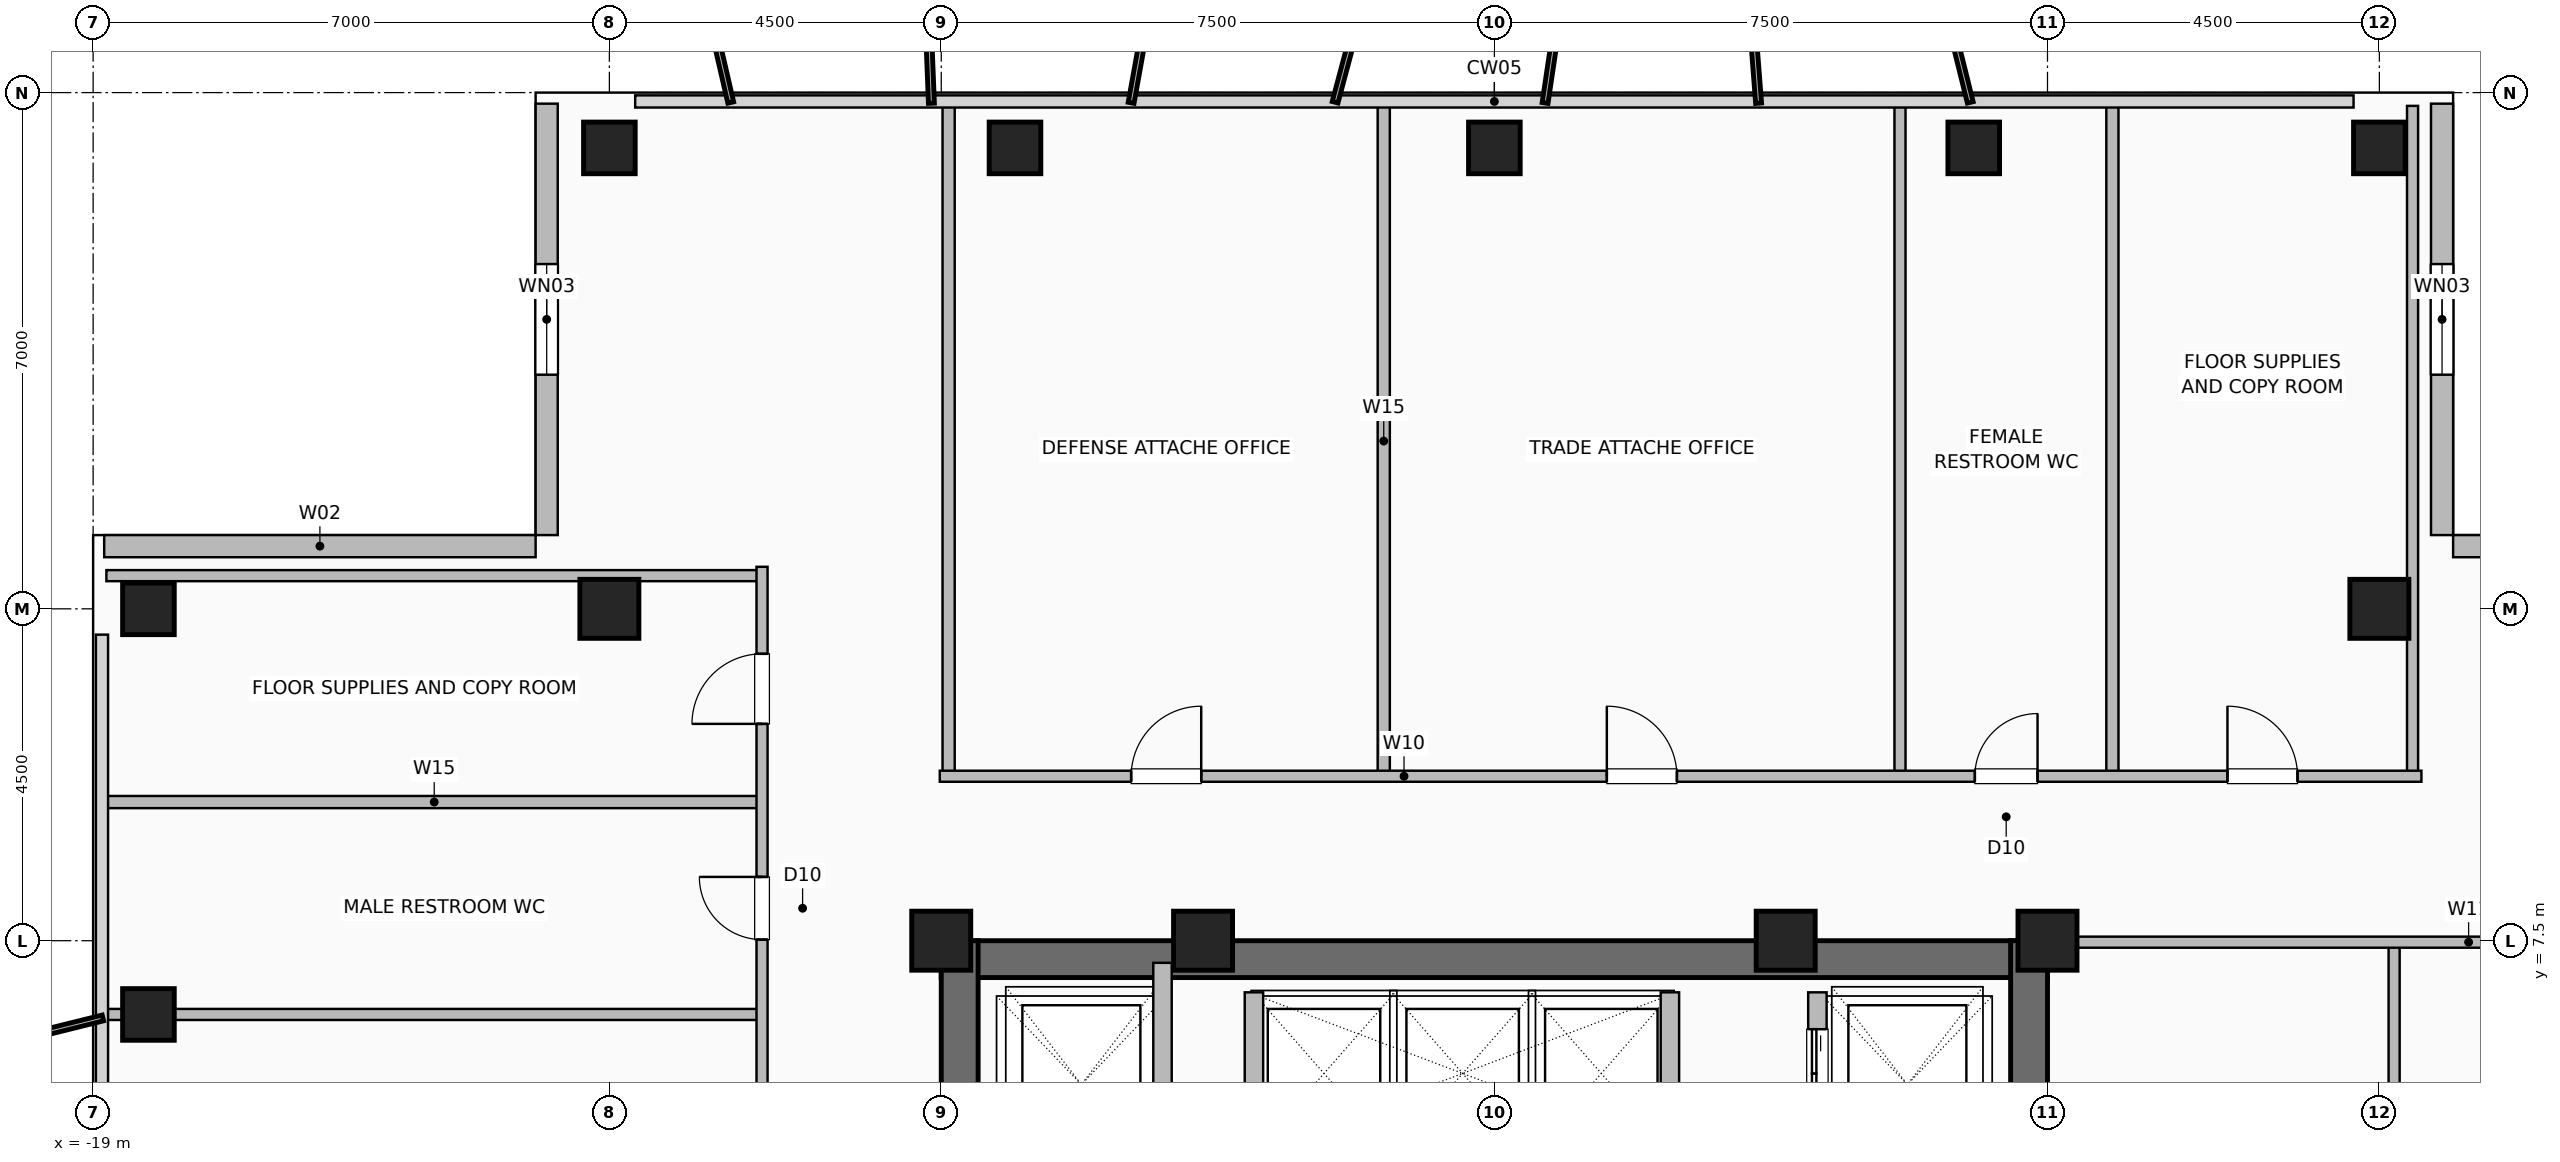
"""IFC4 building model, lengths in metres.
Left out: names, types, materials, properties, quantities, classifications, styles, units other than length and angle.
Written with IfcOpenShell. Run it as: python <this file> out.ifc"""

import sys

from ifc_helpers import new_model, si_unit, direction, frame, frame_2d, origin, origin_2d, place, context, subcontext, project, spatial, rectangle, hollow_rectangle, extrude, element, fill, save


model = new_model("IFC4")
c1 = context("Model", 3, precision=1e-05, world=origin(), true_north=direction((0.0, 1.0)))
c2 = subcontext(c1, "Body", "Model", "MODEL_VIEW")
j1 = project(units=[si_unit("LENGTHUNIT", "METRE"), si_unit("PLANEANGLEUNIT", "RADIAN")], contexts=[c1])
p1 = place(None, origin())
s1 = spatial("IfcSite", under=j1, at=p1, CompositionType="ELEMENT")
p2 = place(p1, origin())
s2 = spatial("IfcBuilding", under=s1, at=p2, CompositionType="ELEMENT")
p3 = place(p2, frame((0.0, 0.0, 239.6)))
s3 = spatial("IfcBuildingStorey", under=s2, at=p3, CompositionType="ELEMENT", Elevation=239.6)
for number, where, z_axis, x_axis in (
    (1, (7.5, 7.5, 0.0), (0.0, 0.0, 1.0), (1.0, 0.0, 0.0)),
    (2, (3.95, 7.5, 0.0), (0.0, 0.0, 1.0), (1.0, 0.0, 0.0)),
    (3, (-3.95, 7.5, 0.0), (0.0, 0.0, 1.0), (1.0, 0.0, 0.0)),
    (4, (-7.5, 7.5, 0.0), (0.0, 0.0, 1.0), (1.0, 0.0, 0.0)),
):
    element("IfcColumn", number, at=place(p3, frame(where, z_axis=z_axis, x_axis=x_axis)), inside=s3, PredefinedType="COLUMN", context=c2, shape_type="SweptSolid", body=[
        extrude(hollow_rectangle(XDim=0.8, YDim=0.8, WallThickness=0.04, at=origin_2d()), origin(), (0.0, 0.0, 1.0), 3.6),
    ])
for number, where, z_axis, x_axis in (
    (5, (-12.0, 18.25, 0.0), (0.0, 0.0, 1.0), (1.0, 0.0, 0.0)),
    (6, (-6.5, 18.25, 0.0), (0.0, 0.0, 1.0), (1.0, 0.0, 0.0)),
    (7, (0.0, 18.25, 0.0), (0.0, 0.0, 1.0), (1.0, 0.0, 0.0)),
    (8, (6.5, 18.25, 0.0), (0.0, 0.0, 1.0), (1.0, 0.0, 0.0)),
    (9, (-18.25, 6.5, 0.0), (0.0, 0.0, 1.0), (1.0, 0.0, 0.0)),
    (10, (12.0, 18.25, 0.0), (0.0, 0.0, 1.0), (1.0, 0.0, 0.0)),
    (11, (-18.25, 12.0, 0.0), (0.0, 0.0, 1.0), (1.0, 0.0, 0.0)),
):
    element("IfcColumn", number, at=place(p3, frame(where, z_axis=z_axis, x_axis=x_axis)), inside=s3, PredefinedType="COLUMN", context=c2, shape_type="SweptSolid", body=[
        extrude(hollow_rectangle(XDim=0.7, YDim=0.7, WallThickness=0.035, at=origin_2d()), origin(), (0.0, 0.0, 1.0), 3.6),
    ])
for number, where, z_axis, x_axis in (
    (12, (12.0, 12.0, 0.0), (0.0, 0.0, 1.0), (1.0, 0.0, 0.0)),
    (13, (-12.0, 12.0, 0.0), (0.0, 0.0, 1.0), (1.0, 0.0, 0.0)),
):
    element("IfcColumn", number, at=place(p3, frame(where, z_axis=z_axis, x_axis=x_axis)), inside=s3, PredefinedType="COLUMN", context=c2, shape_type="SweptSolid", body=[
        extrude(hollow_rectangle(XDim=0.8, YDim=0.8, WallThickness=0.04, at=origin_2d()), origin(), (0.0, 0.0, 1.0), 3.6),
    ])
p4 = place(p3, frame((12.85, 18.85, 0.0), z_axis=(0.0, 0.0, 1.0), x_axis=(0.0, -1.0, 0.0)))
e14 = element("IfcWall", 14, at=p4, inside=s3, PredefinedType="SOLIDWALL", context=c2, shape_type="SweptSolid", body=[
    extrude(rectangle(XDim=5.85, YDim=0.3, at=frame_2d((2.925, 0.0))), origin(), (0.0, 0.0, 1.0), 3.36),
])
p5 = place(p4, frame((2.175, 0.0, 0.9)))
e15 = element("IfcOpeningElement", 15, at=p5, cuts=e14, PredefinedType="OPENING", context=c2, shape_type="SweptSolid", body=[
    extrude(rectangle(XDim=1.5, YDim=1.8, at=frame_2d((0.75, 0.9))), frame((0.0, 0.16, 0.0), z_axis=(0.0, -1.0, 0.0), x_axis=(1.0, 0.0, 0.0)), (0.0, 0.0, 1.0), 0.32),
])
p6 = place(p3, frame((18.85, 12.85, 0.0), z_axis=(0.0, 0.0, 1.0), x_axis=(-1.0, 0.0, 0.0)))
e16 = element("IfcWall", 16, at=p6, inside=s3, PredefinedType="SOLIDWALL", context=c2, shape_type="SweptSolid", body=[
    extrude(rectangle(XDim=5.85, YDim=0.3, at=frame_2d((2.925, 0.0))), origin(), (0.0, 0.0, 1.0), 3.36),
])
p7 = place(p3, frame((-12.85, 18.85, 0.0), z_axis=(0.0, 0.0, 1.0), x_axis=(0.0, -1.0, 0.0)))
e17 = element("IfcWall", 17, at=p7, inside=s3, PredefinedType="SOLIDWALL", context=c2, shape_type="SweptSolid", body=[
    extrude(rectangle(XDim=5.85, YDim=0.3, at=frame_2d((2.925, 0.0))), origin(), (0.0, 0.0, 1.0), 3.36),
])
p8 = place(p7, frame((2.175, 0.0, 0.9)))
e18 = element("IfcOpeningElement", 18, at=p8, cuts=e17, PredefinedType="OPENING", context=c2, shape_type="SweptSolid", body=[
    extrude(rectangle(XDim=1.5, YDim=1.8, at=frame_2d((0.75, 0.9))), frame((0.0, 0.16, 0.0), z_axis=(0.0, -1.0, 0.0), x_axis=(1.0, 0.0, 0.0)), (0.0, 0.0, 1.0), 0.32),
])
p9 = place(p3, frame((-18.85, 12.85, 0.0), z_axis=(0.0, 0.0, 1.0), x_axis=(1.0, 0.0, 0.0)))
e19 = element("IfcWall", 19, at=p9, inside=s3, PredefinedType="SOLIDWALL", context=c2, shape_type="SweptSolid", body=[
    extrude(rectangle(XDim=5.85, YDim=0.3, at=frame_2d((2.925, 0.0))), origin(), (0.0, 0.0, 1.0), 3.36),
])
p10 = place(p3, frame((-7.5, 7.25, 0.0), z_axis=(0.0, 0.0, 1.0), x_axis=(1.0, 0.0, 0.0)))
e20 = element("IfcWall", 20, at=p10, inside=s3, PredefinedType="SHEAR", context=c2, shape_type="SweptSolid", body=[
    extrude(rectangle(XDim=15.0, YDim=0.5, at=frame_2d((7.5, 0.0))), origin(), (0.0, 0.0, 1.0), 3.36),
])
p11 = place(p3, frame((-7.25, -7.5, 0.0), z_axis=(0.0, 0.0, 1.0), x_axis=(0.0, 1.0, 0.0)))
e21 = element("IfcWall", 21, at=p11, inside=s3, PredefinedType="SHEAR", context=c2, shape_type="SweptSolid", body=[
    extrude(rectangle(XDim=15.0, YDim=0.5, at=frame_2d((7.5, 0.0))), origin(), (0.0, 0.0, 1.0), 3.36),
])
p12 = place(p11, frame((9.5, 0.0, 0.0)))
e22 = element("IfcOpeningElement", 22, at=p12, cuts=e21, PredefinedType="OPENING", context=c2, shape_type="SweptSolid", body=[
    extrude(rectangle(XDim=1.0, YDim=2.08, at=frame_2d((0.5, 1.04))), frame((0.0, 0.26, 0.0), z_axis=(0.0, -1.0, 0.0), x_axis=(1.0, 0.0, 0.0)), (0.0, 0.0, 1.0), 0.52),
])
p13 = place(p3, frame((7.25, -7.5, 0.0), z_axis=(0.0, 0.0, 1.0), x_axis=(0.0, 1.0, 0.0)))
e23 = element("IfcWall", 23, at=p13, inside=s3, PredefinedType="SHEAR", context=c2, shape_type="SweptSolid", body=[
    extrude(rectangle(XDim=15.0, YDim=0.5, at=frame_2d((7.5, 0.0))), origin(), (0.0, 0.0, 1.0), 3.36),
])
for number, where, z_axis, x_axis in (
    (24, (-3.26, 4.58, 0.0), (0.0, 0.0, 1.0), (0.0, 1.0, 0.0)),
    (25, (2.38, 4.58, 0.0), (0.0, 0.0, 1.0), (0.0, 1.0, 0.0)),
):
    element("IfcWall", number, at=place(p3, frame(where, z_axis=z_axis, x_axis=x_axis)), inside=s3, PredefinedType="SHEAR", context=c2, shape_type="SweptSolid", body=[
        extrude(rectangle(XDim=2.22, YDim=0.25, at=frame_2d((1.11, 0.0))), origin(), (0.0, 0.0, 1.0), 3.36),
    ])
p14 = place(p3, frame((-4.5, 4.35, 0.0), z_axis=(0.0, 0.0, 1.0), x_axis=(0.0, 1.0, 0.0)))
e26 = element("IfcWall", 26, at=p14, inside=s3, PredefinedType="SHEAR", context=c2, shape_type="SweptSolid", body=[
    extrude(rectangle(XDim=2.85, YDim=0.25, at=frame_2d((1.425, 0.0))), origin(), (0.0, 0.0, 1.0), 3.36),
])
p15 = place(p3, frame((4.38, 4.3, 0.0), z_axis=(0.0, 0.0, 1.0), x_axis=(0.0, 1.0, 0.0)))
e27 = element("IfcWall", 27, at=p15, inside=s3, PredefinedType="SHEAR", context=c2, shape_type="SweptSolid", body=[
    extrude(rectangle(XDim=2.5, YDim=0.25, at=frame_2d((1.25, 0.0))), origin(), (0.0, 0.0, 1.0), 3.36),
])
p16 = place(p15, frame((0.8, 0.0, 0.0)))
e28 = element("IfcOpeningElement", 28, at=p16, cuts=e27, PredefinedType="OPENING", context=c2, shape_type="SweptSolid", body=[
    extrude(rectangle(XDim=1.2, YDim=2.2, at=frame_2d((0.6, 1.1))), frame((0.0, 0.135, 0.0), z_axis=(0.0, -1.0, 0.0), x_axis=(1.0, 0.0, 0.0)), (0.0, 0.0, 1.0), 0.27),
])
p17 = place(p3, frame((-18.82, 9.38, 0.0), z_axis=(0.0, 0.0, 1.0), x_axis=(1.0, 0.0, 0.0)))
e29 = element("IfcWall", 29, at=p17, inside=s3, PredefinedType="PLUMBINGWALL", context=c2, shape_type="SweptSolid", body=[
    extrude(rectangle(XDim=8.89, YDim=0.165, at=frame_2d((4.445, 0.0))), origin(), (0.0, 0.0, 1.0), 3.36),
])
for number, where, z_axis, x_axis in (
    (30, (-18.82, 6.5, 0.0), (0.0, 0.0, 1.0), (1.0, 0.0, 0.0)),
    (31, (-18.82, 12.45, 0.0), (0.0, 0.0, 1.0), (1.0, 0.0, 0.0)),
):
    element("IfcWall", number, at=place(p3, frame(where, z_axis=z_axis, x_axis=x_axis)), inside=s3, PredefinedType="PARTITIONING", context=c2, shape_type="SweptSolid", body=[
        extrude(rectangle(XDim=8.89, YDim=0.15, at=frame_2d((4.445, 0.0))), origin(), (0.0, 0.0, 1.0), 3.36),
    ])
p18 = place(p3, frame((-9.93, -7.52, 0.0), z_axis=(0.0, 0.0, 1.0), x_axis=(0.0, 1.0, 0.0)))
e32 = element("IfcWall", 32, at=p18, inside=s3, PredefinedType="PARTITIONING", context=c2, shape_type="SweptSolid", body=[
    extrude(rectangle(XDim=20.09, YDim=0.15, at=frame_2d((10.045, 0.0))), origin(), (0.0, 0.0, 1.0), 3.36),
])
p19 = place(p18, frame((1.945, 0.0, 0.0)))
e33 = element("IfcOpeningElement", 33, at=p19, cuts=e32, PredefinedType="OPENING", context=c2, shape_type="SweptSolid", body=[
    extrude(rectangle(XDim=0.95, YDim=2.06, at=frame_2d((0.475, 1.03))), frame((0.0, 0.085, 0.0), z_axis=(0.0, -1.0, 0.0), x_axis=(1.0, 0.0, 0.0)), (0.0, 0.0, 1.0), 0.17),
])
p20 = place(p18, frame((6.47, 0.0, 0.0)))
e34 = element("IfcOpeningElement", 34, at=p20, cuts=e32, PredefinedType="OPENING", context=c2, shape_type="SweptSolid", body=[
    extrude(rectangle(XDim=0.95, YDim=2.06, at=frame_2d((0.475, 1.03))), frame((0.0, 0.085, 0.0), z_axis=(0.0, -1.0, 0.0), x_axis=(1.0, 0.0, 0.0)), (0.0, 0.0, 1.0), 0.17),
])
p21 = place(p18, frame((11.12, 0.0, 0.0)))
e35 = element("IfcOpeningElement", 35, at=p21, cuts=e32, PredefinedType="OPENING", context=c2, shape_type="SweptSolid", body=[
    extrude(rectangle(XDim=0.95, YDim=2.06, at=frame_2d((0.475, 1.03))), frame((0.0, 0.085, 0.0), z_axis=(0.0, -1.0, 0.0), x_axis=(1.0, 0.0, 0.0)), (0.0, 0.0, 1.0), 0.17),
])
p22 = place(p18, frame((15.035, 0.0, 0.0)))
e36 = element("IfcOpeningElement", 36, at=p22, cuts=e32, PredefinedType="OPENING", context=c2, shape_type="SweptSolid", body=[
    extrude(rectangle(XDim=0.85, YDim=2.05, at=frame_2d((0.425, 1.025))), frame((0.0, 0.085, 0.0), z_axis=(0.0, -1.0, 0.0), x_axis=(1.0, 0.0, 0.0)), (0.0, 0.0, 1.0), 0.17),
])
p23 = place(p18, frame((17.96, 0.0, 0.0)))
e37 = element("IfcOpeningElement", 37, at=p23, cuts=e32, PredefinedType="OPENING", context=c2, shape_type="SweptSolid", body=[
    extrude(rectangle(XDim=0.95, YDim=2.06, at=frame_2d((0.475, 1.03))), frame((0.0, 0.085, 0.0), z_axis=(0.0, -1.0, 0.0), x_axis=(1.0, 0.0, 0.0)), (0.0, 0.0, 1.0), 0.17),
])
for number, where, z_axis, x_axis in (
    (38, (8.38, 9.73, 0.0), (0.0, 0.0, 1.0), (0.0, 1.0, 0.0)),
    (39, (-7.4, 9.73, 0.0), (0.0, 0.0, 1.0), (0.0, 1.0, 0.0)),
    (40, (-1.5, 9.73, 0.0), (0.0, 0.0, 1.0), (0.0, 1.0, 0.0)),
):
    element("IfcWall", number, at=place(p3, frame(where, z_axis=z_axis, x_axis=x_axis)), inside=s3, PredefinedType="PLUMBINGWALL", context=c2, shape_type="SweptSolid", body=[
        extrude(rectangle(XDim=9.09, YDim=0.165, at=frame_2d((4.545, 0.0))), origin(), (0.0, 0.0, 1.0), 3.36),
    ])
for number, where, z_axis, x_axis in (
    (41, (5.5, 9.73, 0.0), (0.0, 0.0, 1.0), (0.0, 1.0, 0.0)),
    (42, (12.45, 9.73, 0.0), (0.0, 0.0, 1.0), (0.0, 1.0, 0.0)),
):
    element("IfcWall", number, at=place(p3, frame(where, z_axis=z_axis, x_axis=x_axis)), inside=s3, PredefinedType="PARTITIONING", context=c2, shape_type="SweptSolid", body=[
        extrude(rectangle(XDim=9.09, YDim=0.15, at=frame_2d((4.545, 0.0))), origin(), (0.0, 0.0, 1.0), 3.36),
    ])
p24 = place(p3, frame((-7.52, 9.73, 0.0), z_axis=(0.0, 0.0, 1.0), x_axis=(1.0, 0.0, 0.0)))
e43 = element("IfcWall", 43, at=p24, inside=s3, PredefinedType="PARTITIONING", context=c2, shape_type="SweptSolid", body=[
    extrude(rectangle(XDim=20.09, YDim=0.15, at=frame_2d((10.045, 0.0))), origin(), (0.0, 0.0, 1.0), 3.36),
])
p25 = place(p24, frame((2.595, 0.0, 0.0)))
e44 = element("IfcOpeningElement", 44, at=p25, cuts=e43, PredefinedType="OPENING", context=c2, shape_type="SweptSolid", body=[
    extrude(rectangle(XDim=0.95, YDim=2.06, at=frame_2d((0.475, 1.03))), frame((0.0, 0.085, 0.0), z_axis=(0.0, -1.0, 0.0), x_axis=(1.0, 0.0, 0.0)), (0.0, 0.0, 1.0), 0.17),
])
p26 = place(p24, frame((9.045, 0.0, 0.0)))
e45 = element("IfcOpeningElement", 45, at=p26, cuts=e43, PredefinedType="OPENING", context=c2, shape_type="SweptSolid", body=[
    extrude(rectangle(XDim=0.95, YDim=2.06, at=frame_2d((0.475, 1.03))), frame((0.0, 0.085, 0.0), z_axis=(0.0, -1.0, 0.0), x_axis=(1.0, 0.0, 0.0)), (0.0, 0.0, 1.0), 0.17),
])
p27 = place(p24, frame((14.035, 0.0, 0.0)))
e46 = element("IfcOpeningElement", 46, at=p27, cuts=e43, PredefinedType="OPENING", context=c2, shape_type="SweptSolid", body=[
    extrude(rectangle(XDim=0.85, YDim=2.05, at=frame_2d((0.425, 1.025))), frame((0.0, 0.085, 0.0), z_axis=(0.0, -1.0, 0.0), x_axis=(1.0, 0.0, 0.0)), (0.0, 0.0, 1.0), 0.17),
])
p28 = place(p24, frame((17.46, 0.0, 0.0)))
e47 = element("IfcOpeningElement", 47, at=p28, cuts=e43, PredefinedType="OPENING", context=c2, shape_type="SweptSolid", body=[
    extrude(rectangle(XDim=0.95, YDim=2.06, at=frame_2d((0.475, 1.03))), frame((0.0, 0.085, 0.0), z_axis=(0.0, -1.0, 0.0), x_axis=(1.0, 0.0, 0.0)), (0.0, 0.0, 1.0), 0.17),
])
p29 = place(p3, frame((12.2, -7.48, 0.0), z_axis=(0.0, 0.0, 1.0), x_axis=(0.0, 1.0, 0.0)))
e48 = element("IfcWall", 48, at=p29, inside=s3, PredefinedType="PARTITIONING", context=c2, shape_type="SweptSolid", body=[
    extrude(rectangle(XDim=14.9, YDim=0.15, at=frame_2d((7.45, 0.0))), origin(), (0.0, 0.0, 1.0), 3.36),
])
p30 = place(p3, frame((7.6, 7.48, 0.0), z_axis=(0.0, 0.0, 1.0), x_axis=(1.0, 0.0, 0.0)))
e49 = element("IfcWall", 49, at=p30, inside=s3, PredefinedType="PARTITIONING", context=c2, shape_type="SweptSolid", body=[
    extrude(rectangle(XDim=11.22, YDim=0.15, at=frame_2d((5.61, 0.0))), origin(), (0.0, 0.0, 1.0), 3.36),
])
p31 = place(p5, origin())
e50 = element("IfcWindow", 50, at=p31, inside=s3, PartitioningType="SINGLE_PANEL", PredefinedType="WINDOW", context=c2, shape_type="SweptSolid", body=[
    extrude(rectangle(XDim=1.5, YDim=1.8, at=frame_2d((0.75, 0.9))), frame((0.0, 0.03, 0.0), z_axis=(0.0, -1.0, 0.0), x_axis=(1.0, 0.0, 0.0)), (0.0, 0.0, 1.0), 0.06),
])
fill(e15, e50)
p32 = place(p8, origin())
e51 = element("IfcWindow", 51, at=p32, inside=s3, PartitioningType="SINGLE_PANEL", PredefinedType="WINDOW", context=c2, shape_type="SweptSolid", body=[
    extrude(rectangle(XDim=1.5, YDim=1.8, at=frame_2d((0.75, 0.9))), frame((0.0, 0.03, 0.0), z_axis=(0.0, -1.0, 0.0), x_axis=(1.0, 0.0, 0.0)), (0.0, 0.0, 1.0), 0.06),
])
fill(e18, e51)
p33 = place(p16, origin())
e52 = element("IfcDoor", 52, at=p33, inside=s3, OperationType="DOUBLE_DOOR_SLIDING", PredefinedType="DOOR", context=c2, shape_type="SweptSolid", body=[
    extrude(rectangle(XDim=1.2, YDim=2.2, at=frame_2d((0.6, 1.1))), frame((0.0, 0.025, 0.0), z_axis=(0.0, -1.0, 0.0), x_axis=(1.0, 0.0, 0.0)), (0.0, 0.0, 1.0), 0.05),
])
fill(e28, e52)
p34 = place(p22, origin())
e53 = element("IfcDoor", 53, at=p34, inside=s3, OperationType="SINGLE_SWING_RIGHT", PredefinedType="DOOR", context=c2, shape_type="SweptSolid", body=[
    extrude(rectangle(XDim=0.85, YDim=2.05, at=frame_2d((0.425, 1.025))), frame((0.0, 0.025, 0.0), z_axis=(0.0, -1.0, 0.0), x_axis=(1.0, 0.0, 0.0)), (0.0, 0.0, 1.0), 0.05),
])
fill(e36, e53)
p35 = place(p23, origin())
e54 = element("IfcDoor", 54, at=p35, inside=s3, OperationType="SINGLE_SWING_LEFT", PredefinedType="DOOR", context=c2, shape_type="SweptSolid", body=[
    extrude(rectangle(XDim=0.95, YDim=2.06, at=frame_2d((0.475, 1.03))), frame((0.0, 0.025, 0.0), z_axis=(0.0, -1.0, 0.0), x_axis=(1.0, 0.0, 0.0)), (0.0, 0.0, 1.0), 0.05),
])
fill(e37, e54)
p36 = place(p25, origin())
e55 = element("IfcDoor", 55, at=p36, inside=s3, OperationType="SINGLE_SWING_RIGHT", PredefinedType="DOOR", context=c2, shape_type="SweptSolid", body=[
    extrude(rectangle(XDim=0.95, YDim=2.06, at=frame_2d((0.475, 1.03))), frame((0.0, 0.025, 0.0), z_axis=(0.0, -1.0, 0.0), x_axis=(1.0, 0.0, 0.0)), (0.0, 0.0, 1.0), 0.05),
])
fill(e44, e55)
p37 = place(p26, origin())
e56 = element("IfcDoor", 56, at=p37, inside=s3, OperationType="SINGLE_SWING_LEFT", PredefinedType="DOOR", context=c2, shape_type="SweptSolid", body=[
    extrude(rectangle(XDim=0.95, YDim=2.06, at=frame_2d((0.475, 1.03))), frame((0.0, 0.025, 0.0), z_axis=(0.0, -1.0, 0.0), x_axis=(1.0, 0.0, 0.0)), (0.0, 0.0, 1.0), 0.05),
])
fill(e45, e56)
p38 = place(p27, origin())
e57 = element("IfcDoor", 57, at=p38, inside=s3, OperationType="SINGLE_SWING_RIGHT", PredefinedType="DOOR", context=c2, shape_type="SweptSolid", body=[
    extrude(rectangle(XDim=0.85, YDim=2.05, at=frame_2d((0.425, 1.025))), frame((0.0, 0.025, 0.0), z_axis=(0.0, -1.0, 0.0), x_axis=(1.0, 0.0, 0.0)), (0.0, 0.0, 1.0), 0.05),
])
fill(e46, e57)
p39 = place(p28, origin())
e58 = element("IfcDoor", 58, at=p39, inside=s3, OperationType="SINGLE_SWING_LEFT", PredefinedType="DOOR", context=c2, shape_type="SweptSolid", body=[
    extrude(rectangle(XDim=0.95, YDim=2.06, at=frame_2d((0.475, 1.03))), frame((0.0, 0.025, 0.0), z_axis=(0.0, -1.0, 0.0), x_axis=(1.0, 0.0, 0.0)), (0.0, 0.0, 1.0), 0.05),
])
fill(e47, e58)
save(model, sys.argv[1])
